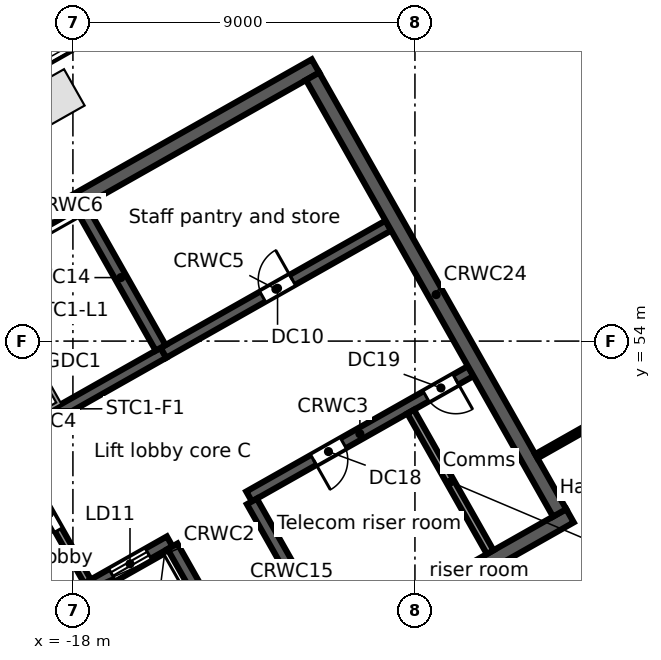
"""IFC4 building model, lengths in metres.
Left out: names, types, materials, properties, quantities, classifications, styles, units other than length and angle.
Written with IfcOpenShell. Run it as: python <this file> out.ifc"""

import sys

from ifc_helpers import new_model, si_unit, direction, frame, frame_2d, origin, origin_2d, place, context, subcontext, project, spatial, rectangle, extrude, element, fill, save


model = new_model("IFC4")
c1 = context("Model", 3, precision=1e-05, world=origin(), true_north=direction((0.0, 1.0)))
c2 = subcontext(c1, "Body", "Model", "MODEL_VIEW")
j1 = project(units=[si_unit("LENGTHUNIT", "METRE"), si_unit("PLANEANGLEUNIT", "RADIAN")], contexts=[c1])
p1 = place(None, origin())
s1 = spatial("IfcSite", under=j1, at=p1, CompositionType="ELEMENT")
p2 = place(p1, origin())
s2 = spatial("IfcBuilding", under=s1, at=p2, CompositionType="ELEMENT")
p3 = place(p2, frame((0.0, 0.0, 281.7)))
s3 = spatial("IfcBuildingStorey", under=s2, at=p3, CompositionType="ELEMENT", Elevation=281.7)
p4 = place(p3, frame((-18.441, 60.406, 0.0), z_axis=(0.0, 0.0, 1.0), x_axis=(-0.87035569594, -0.492423560103, 0.0)))
e1 = element("IfcColumn", 1, at=p4, inside=s3, PredefinedType="COLUMN", context=c2, shape_type="SweptSolid", body=[
    extrude(rectangle(XDim=1.1, YDim=1.1, at=origin_2d()), origin(), (0.0, 0.0, 1.0), 3.8),
])
p5 = place(p3, frame((-58.732, 38.771, 0.0), z_axis=(0.0, 0.0, 1.0), x_axis=(0.870355615581, 0.492423702137, 0.0)))
e2 = element("IfcWall", 2, at=p5, inside=s3, PredefinedType="STANDARD", context=c2, shape_type="SweptSolid", body=[
    extrude(rectangle(XDim=64.052, YDim=0.25, at=frame_2d((32.026, 0.0))), origin(), (0.0, 0.0, 1.0), 3.45),
])
p6 = place(p5, frame((61.259, 0.0, 0.8)))
e3 = element("IfcOpeningElement", 3, at=p6, cuts=e2, PredefinedType="OPENING", context=c2, shape_type="SweptSolid", body=[
    extrude(rectangle(XDim=2.4, YDim=2.2, at=frame_2d((1.2, 1.1))), frame((0.0, 0.135, 0.0), z_axis=(0.0, -1.0, 0.0), x_axis=(1.0, 0.0, 0.0)), (0.0, 0.0, 1.0), 0.27),
])
p7 = place(p5, frame((58.216, 0.0, 0.8)))
e4 = element("IfcOpeningElement", 4, at=p7, cuts=e2, PredefinedType="OPENING", context=c2, shape_type="SweptSolid", body=[
    extrude(rectangle(XDim=2.4, YDim=2.2, at=frame_2d((1.2, 1.1))), frame((0.0, 0.135, 0.0), z_axis=(0.0, -1.0, 0.0), x_axis=(1.0, 0.0, 0.0)), (0.0, 0.0, 1.0), 0.27),
])
p8 = place(p5, frame((55.173, 0.0, 0.8)))
e5 = element("IfcOpeningElement", 5, at=p8, cuts=e2, PredefinedType="OPENING", context=c2, shape_type="SweptSolid", body=[
    extrude(rectangle(XDim=2.4, YDim=2.2, at=frame_2d((1.2, 1.1))), frame((0.0, 0.135, 0.0), z_axis=(0.0, -1.0, 0.0), x_axis=(1.0, 0.0, 0.0)), (0.0, 0.0, 1.0), 0.27),
])
p9 = place(p5, frame((52.129, 0.0, 0.8)))
e6 = element("IfcOpeningElement", 6, at=p9, cuts=e2, PredefinedType="OPENING", context=c2, shape_type="SweptSolid", body=[
    extrude(rectangle(XDim=2.4, YDim=2.2, at=frame_2d((1.2, 1.1))), frame((0.0, 0.135, 0.0), z_axis=(0.0, -1.0, 0.0), x_axis=(1.0, 0.0, 0.0)), (0.0, 0.0, 1.0), 0.27),
])
p10 = place(p5, frame((49.086, 0.0, 0.8)))
e7 = element("IfcOpeningElement", 7, at=p10, cuts=e2, PredefinedType="OPENING", context=c2, shape_type="SweptSolid", body=[
    extrude(rectangle(XDim=2.4, YDim=2.2, at=frame_2d((1.2, 1.1))), frame((0.0, 0.135, 0.0), z_axis=(0.0, -1.0, 0.0), x_axis=(1.0, 0.0, 0.0)), (0.0, 0.0, 1.0), 0.27),
])
p11 = place(p5, frame((46.043, 0.0, 0.8)))
e8 = element("IfcOpeningElement", 8, at=p11, cuts=e2, PredefinedType="OPENING", context=c2, shape_type="SweptSolid", body=[
    extrude(rectangle(XDim=2.4, YDim=2.2, at=frame_2d((1.2, 1.1))), frame((0.0, 0.135, 0.0), z_axis=(0.0, -1.0, 0.0), x_axis=(1.0, 0.0, 0.0)), (0.0, 0.0, 1.0), 0.27),
])
p12 = place(p5, frame((43.0, 0.0, 0.8)))
e9 = element("IfcOpeningElement", 9, at=p12, cuts=e2, PredefinedType="OPENING", context=c2, shape_type="SweptSolid", body=[
    extrude(rectangle(XDim=2.4, YDim=2.2, at=frame_2d((1.2, 1.1))), frame((0.0, 0.135, 0.0), z_axis=(0.0, -1.0, 0.0), x_axis=(1.0, 0.0, 0.0)), (0.0, 0.0, 1.0), 0.27),
])
p13 = place(p5, frame((39.956, 0.0, 0.8)))
e10 = element("IfcOpeningElement", 10, at=p13, cuts=e2, PredefinedType="OPENING", context=c2, shape_type="SweptSolid", body=[
    extrude(rectangle(XDim=2.4, YDim=2.2, at=frame_2d((1.2, 1.1))), frame((0.0, 0.135, 0.0), z_axis=(0.0, -1.0, 0.0), x_axis=(1.0, 0.0, 0.0)), (0.0, 0.0, 1.0), 0.27),
])
p14 = place(p5, frame((36.913, 0.0, 0.8)))
e11 = element("IfcOpeningElement", 11, at=p14, cuts=e2, PredefinedType="OPENING", context=c2, shape_type="SweptSolid", body=[
    extrude(rectangle(XDim=2.4, YDim=2.2, at=frame_2d((1.2, 1.1))), frame((0.0, 0.135, 0.0), z_axis=(0.0, -1.0, 0.0), x_axis=(1.0, 0.0, 0.0)), (0.0, 0.0, 1.0), 0.27),
])
p15 = place(p5, frame((33.87, 0.0, 0.8)))
e12 = element("IfcOpeningElement", 12, at=p15, cuts=e2, PredefinedType="OPENING", context=c2, shape_type="SweptSolid", body=[
    extrude(rectangle(XDim=2.4, YDim=2.2, at=frame_2d((1.2, 1.1))), frame((0.0, 0.135, 0.0), z_axis=(0.0, -1.0, 0.0), x_axis=(1.0, 0.0, 0.0)), (0.0, 0.0, 1.0), 0.27),
])
p16 = place(p5, frame((30.826, 0.0, 0.8)))
e13 = element("IfcOpeningElement", 13, at=p16, cuts=e2, PredefinedType="OPENING", context=c2, shape_type="SweptSolid", body=[
    extrude(rectangle(XDim=2.4, YDim=2.2, at=frame_2d((1.2, 1.1))), frame((0.0, 0.135, 0.0), z_axis=(0.0, -1.0, 0.0), x_axis=(1.0, 0.0, 0.0)), (0.0, 0.0, 1.0), 0.27),
])
p17 = place(p5, frame((27.783, 0.0, 0.8)))
e14 = element("IfcOpeningElement", 14, at=p17, cuts=e2, PredefinedType="OPENING", context=c2, shape_type="SweptSolid", body=[
    extrude(rectangle(XDim=2.4, YDim=2.2, at=frame_2d((1.2, 1.1))), frame((0.0, 0.135, 0.0), z_axis=(0.0, -1.0, 0.0), x_axis=(1.0, 0.0, 0.0)), (0.0, 0.0, 1.0), 0.27),
])
p18 = place(p5, frame((24.74, 0.0, 0.8)))
e15 = element("IfcOpeningElement", 15, at=p18, cuts=e2, PredefinedType="OPENING", context=c2, shape_type="SweptSolid", body=[
    extrude(rectangle(XDim=2.4, YDim=2.2, at=frame_2d((1.2, 1.1))), frame((0.0, 0.135, 0.0), z_axis=(0.0, -1.0, 0.0), x_axis=(1.0, 0.0, 0.0)), (0.0, 0.0, 1.0), 0.27),
])
p19 = place(p5, frame((21.696, 0.0, 0.8)))
e16 = element("IfcOpeningElement", 16, at=p19, cuts=e2, PredefinedType="OPENING", context=c2, shape_type="SweptSolid", body=[
    extrude(rectangle(XDim=2.4, YDim=2.2, at=frame_2d((1.2, 1.1))), frame((0.0, 0.135, 0.0), z_axis=(0.0, -1.0, 0.0), x_axis=(1.0, 0.0, 0.0)), (0.0, 0.0, 1.0), 0.27),
])
p20 = place(p5, frame((18.653, 0.0, 0.8)))
e17 = element("IfcOpeningElement", 17, at=p20, cuts=e2, PredefinedType="OPENING", context=c2, shape_type="SweptSolid", body=[
    extrude(rectangle(XDim=2.4, YDim=2.2, at=frame_2d((1.2, 1.1))), frame((0.0, 0.135, 0.0), z_axis=(0.0, -1.0, 0.0), x_axis=(1.0, 0.0, 0.0)), (0.0, 0.0, 1.0), 0.27),
])
p21 = place(p5, frame((15.61, 0.0, 0.8)))
e18 = element("IfcOpeningElement", 18, at=p21, cuts=e2, PredefinedType="OPENING", context=c2, shape_type="SweptSolid", body=[
    extrude(rectangle(XDim=2.4, YDim=2.2, at=frame_2d((1.2, 1.1))), frame((0.0, 0.135, 0.0), z_axis=(0.0, -1.0, 0.0), x_axis=(1.0, 0.0, 0.0)), (0.0, 0.0, 1.0), 0.27),
])
p22 = place(p5, frame((12.567, 0.0, 0.8)))
e19 = element("IfcOpeningElement", 19, at=p22, cuts=e2, PredefinedType="OPENING", context=c2, shape_type="SweptSolid", body=[
    extrude(rectangle(XDim=2.4, YDim=2.2, at=frame_2d((1.2, 1.1))), frame((0.0, 0.135, 0.0), z_axis=(0.0, -1.0, 0.0), x_axis=(1.0, 0.0, 0.0)), (0.0, 0.0, 1.0), 0.27),
])
p23 = place(p5, frame((9.523, 0.0, 0.8)))
e20 = element("IfcOpeningElement", 20, at=p23, cuts=e2, PredefinedType="OPENING", context=c2, shape_type="SweptSolid", body=[
    extrude(rectangle(XDim=2.4, YDim=2.2, at=frame_2d((1.2, 1.1))), frame((0.0, 0.135, 0.0), z_axis=(0.0, -1.0, 0.0), x_axis=(1.0, 0.0, 0.0)), (0.0, 0.0, 1.0), 0.27),
])
p24 = place(p5, frame((6.48, 0.0, 0.8)))
e21 = element("IfcOpeningElement", 21, at=p24, cuts=e2, PredefinedType="OPENING", context=c2, shape_type="SweptSolid", body=[
    extrude(rectangle(XDim=2.4, YDim=2.2, at=frame_2d((1.2, 1.1))), frame((0.0, 0.135, 0.0), z_axis=(0.0, -1.0, 0.0), x_axis=(1.0, 0.0, 0.0)), (0.0, 0.0, 1.0), 0.27),
])
p25 = place(p5, frame((3.437, 0.0, 0.8)))
e22 = element("IfcOpeningElement", 22, at=p25, cuts=e2, PredefinedType="OPENING", context=c2, shape_type="SweptSolid", body=[
    extrude(rectangle(XDim=2.4, YDim=2.2, at=frame_2d((1.2, 1.1))), frame((0.0, 0.135, 0.0), z_axis=(0.0, -1.0, 0.0), x_axis=(1.0, 0.0, 0.0)), (0.0, 0.0, 1.0), 0.27),
])
p26 = place(p5, frame((0.393, 0.0, 0.8)))
e23 = element("IfcOpeningElement", 23, at=p26, cuts=e2, PredefinedType="OPENING", context=c2, shape_type="SweptSolid", body=[
    extrude(rectangle(XDim=2.4, YDim=2.2, at=frame_2d((1.2, 1.1))), frame((0.0, 0.135, 0.0), z_axis=(0.0, -1.0, 0.0), x_axis=(1.0, 0.0, 0.0)), (0.0, 0.0, 1.0), 0.27),
])
p27 = place(p3, frame((-17.975, 42.017, 0.0), z_axis=(0.0, 0.0, 1.0), x_axis=(0.87034965173, 0.492434243055, 0.0)))
e24 = element("IfcWall", 24, at=p27, inside=s3, PredefinedType="SOLIDWALL", context=c2, shape_type="SweptSolid", body=[
    extrude(rectangle(XDim=15.0, YDim=0.4, at=frame_2d((7.5, 0.0))), origin(), (0.0, 0.0, 1.0), 3.45),
])
p28 = place(p27, frame((6.1, 0.0, 0.0)))
e25 = element("IfcOpeningElement", 25, at=p28, cuts=e24, PredefinedType="OPENING", context=c2, shape_type="SweptSolid", body=[
    extrude(rectangle(XDim=1.2, YDim=2.1, at=frame_2d((0.6, 1.05))), frame((0.0, 0.21, 0.0), z_axis=(0.0, -1.0, 0.0), x_axis=(1.0, 0.0, 0.0)), (0.0, 0.0, 1.0), 0.42),
])
p29 = place(p3, frame((-19.892, 46.218, 0.0), z_axis=(0.0, 0.0, 1.0), x_axis=(0.870341639186, 0.492448404505, 0.0)))
e26 = element("IfcWall", 26, at=p29, inside=s3, PredefinedType="SOLIDWALL", context=c2, shape_type="SweptSolid", body=[
    extrude(rectangle(XDim=5.1, YDim=0.3, at=frame_2d((2.55, 0.0))), origin(), (0.0, 0.0, 1.0), 3.45),
])
p30 = place(p29, frame((0.75, 0.0, 0.0)))
e27 = element("IfcOpeningElement", 27, at=p30, cuts=e26, PredefinedType="OPENING", context=c2, shape_type="SweptSolid", body=[
    extrude(rectangle(XDim=1.1, YDim=2.1, at=frame_2d((0.55, 1.05))), frame((0.0, 0.16, 0.0), z_axis=(0.0, -1.0, 0.0), x_axis=(1.0, 0.0, 0.0)), (0.0, 0.0, 1.0), 0.32),
])
p31 = place(p29, frame((3.35, 0.0, 0.0)))
e28 = element("IfcOpeningElement", 28, at=p31, cuts=e26, PredefinedType="OPENING", context=c2, shape_type="SweptSolid", body=[
    extrude(rectangle(XDim=1.1, YDim=2.1, at=frame_2d((0.55, 1.05))), frame((0.0, 0.16, 0.0), z_axis=(0.0, -1.0, 0.0), x_axis=(1.0, 0.0, 0.0)), (0.0, 0.0, 1.0), 0.32),
])
p32 = place(p3, frame((-13.365, 49.911, 0.0), z_axis=(0.0, 0.0, 1.0), x_axis=(0.870347618718, 0.492437836272, 0.0)))
e29 = element("IfcWall", 29, at=p32, inside=s3, PredefinedType="SOLIDWALL", context=c2, shape_type="SweptSolid", body=[
    extrude(rectangle(XDim=6.7, YDim=0.3, at=frame_2d((3.35, 0.0))), origin(), (0.0, 0.0, 1.0), 3.45),
])
p33 = place(p32, frame((1.95, 0.0, 0.0)))
e30 = element("IfcOpeningElement", 30, at=p33, cuts=e29, PredefinedType="OPENING", context=c2, shape_type="SweptSolid", body=[
    extrude(rectangle(XDim=0.9, YDim=2.1, at=frame_2d((0.45, 1.05))), frame((0.0, 0.16, 0.0), z_axis=(0.0, -1.0, 0.0), x_axis=(1.0, 0.0, 0.0)), (0.0, 0.0, 1.0), 0.32),
])
p34 = place(p32, frame((5.35, 0.0, 0.0)))
e31 = element("IfcOpeningElement", 31, at=p34, cuts=e29, PredefinedType="OPENING", context=c2, shape_type="SweptSolid", body=[
    extrude(rectangle(XDim=0.9, YDim=2.1, at=frame_2d((0.45, 1.05))), frame((0.0, 0.16, 0.0), z_axis=(0.0, -1.0, 0.0), x_axis=(1.0, 0.0, 0.0)), (0.0, 0.0, 1.0), 0.32),
])
p35 = place(p3, frame((-22.059, 50.047, 0.0), z_axis=(0.0, 0.0, 1.0), x_axis=(0.87035077051, 0.49243226567, 0.0)))
e32 = element("IfcWall", 32, at=p35, inside=s3, PredefinedType="SOLIDWALL", context=c2, shape_type="SweptSolid", body=[
    extrude(rectangle(XDim=7.4, YDim=0.3, at=frame_2d((3.7, 0.0))), origin(), (0.0, 0.0, 1.0), 3.45),
])
p36 = place(p35, frame((0.4, 0.0, 0.0)))
e33 = element("IfcOpeningElement", 33, at=p36, cuts=e32, PredefinedType="OPENING", context=c2, shape_type="SweptSolid", body=[
    extrude(rectangle(XDim=1.0, YDim=2.1, at=frame_2d((0.5, 1.05))), frame((0.0, 0.16, 0.0), z_axis=(0.0, -1.0, 0.0), x_axis=(1.0, 0.0, 0.0)), (0.0, 0.0, 1.0), 0.32),
])
p37 = place(p3, frame((-15.618, 53.691, 0.0), z_axis=(0.0, 0.0, 1.0), x_axis=(0.870362830851, 0.492410948978, 0.0)))
e34 = element("IfcWall", 34, at=p37, inside=s3, PredefinedType="SOLIDWALL", context=c2, shape_type="SweptSolid", body=[
    extrude(rectangle(XDim=6.8, YDim=0.3, at=frame_2d((3.4, 0.0))), origin(), (0.0, 0.0, 1.0), 3.45),
])
p38 = place(p37, frame((3.0, 0.0, 0.0)))
e35 = element("IfcOpeningElement", 35, at=p38, cuts=e34, PredefinedType="OPENING", context=c2, shape_type="SweptSolid", body=[
    extrude(rectangle(XDim=0.9, YDim=2.1, at=frame_2d((0.45, 1.05))), frame((0.0, 0.16, 0.0), z_axis=(0.0, -1.0, 0.0), x_axis=(1.0, 0.0, 0.0)), (0.0, 0.0, 1.0), 0.32),
])
p39 = place(p3, frame((-24.672, 53.854, 0.0), z_axis=(0.0, 0.0, 1.0), x_axis=(0.870353598469, 0.492427267353, 0.0)))
e36 = element("IfcWall", 36, at=p39, inside=s3, PredefinedType="SOLIDWALL", context=c2, shape_type="SweptSolid", body=[
    extrude(rectangle(XDim=15.0, YDim=0.4, at=frame_2d((7.5, 0.0))), origin(), (0.0, 0.0, 1.0), 3.45),
])
p40 = place(p3, frame((-24.4, 53.779, 0.0), z_axis=(0.0, 0.0, 1.0), x_axis=(0.492421663121, -0.870356769198, 0.0)))
e37 = element("IfcWall", 37, at=p40, inside=s3, PredefinedType="SOLIDWALL", context=c2, shape_type="SweptSolid", body=[
    extrude(rectangle(XDim=13.2, YDim=0.4, at=frame_2d((6.6, 0.0))), origin(), (0.0, 0.0, 1.0), 3.45),
])
p41 = place(p3, frame((-19.635, 51.246, 0.0), z_axis=(0.0, 0.0, 1.0), x_axis=(0.492408451753, -0.87036424366, 0.0)))
e38 = element("IfcWall", 38, at=p41, inside=s3, PredefinedType="PARTITIONING", context=c2, shape_type="SweptSolid", body=[
    extrude(rectangle(XDim=4.1, YDim=0.2, at=frame_2d((2.05, 0.0))), origin(), (0.0, 0.0, 1.0), 3.45),
])
p42 = place(p41, frame((1.55, 0.0, 0.0)))
e39 = element("IfcOpeningElement", 39, at=p42, cuts=e38, PredefinedType="OPENING", context=c2, shape_type="SweptSolid", body=[
    extrude(rectangle(XDim=1.0, YDim=2.1, at=frame_2d((0.5, 1.05))), frame((0.0, 0.11, 0.0), z_axis=(0.0, -1.0, 0.0), x_axis=(1.0, 0.0, 0.0)), (0.0, 0.0, 1.0), 0.22),
])
for number, where, z_axis, x_axis in (
    (40, (-15.379, 48.599, 0.0), (0.0, 0.0, 1.0), (0.492, -0.87, 0.0)),
    (41, (-17.785, 57.521, 0.0), (0.0, 0.0, 1.0), (0.492, -0.87, 0.0)),
):
    element("IfcWall", number, at=place(p3, frame(where, z_axis=z_axis, x_axis=x_axis)), inside=s3, PredefinedType="SOLIDWALL", context=c2, shape_type="SweptSolid", body=[
        extrude(rectangle(XDim=4.25, YDim=0.3, at=frame_2d((2.125, 0.0))), origin(), (0.0, 0.0, 1.0), 3.45),
    ])
p43 = place(p3, frame((-13.291, 49.781, 0.0), z_axis=(0.0, 0.0, 1.0), x_axis=(0.492397924348, -0.870370199454, 0.0)))
e42 = element("IfcWall", 42, at=p43, inside=s3, PredefinedType="SOLIDWALL", context=c2, shape_type="SweptSolid", body=[
    extrude(rectangle(XDim=4.25, YDim=0.3, at=frame_2d((2.125, 0.0))), origin(), (0.0, 0.0, 1.0), 3.45),
])
p44 = place(p3, frame((-9.113, 52.144, 0.0), z_axis=(0.0, 0.0, 1.0), x_axis=(0.492422543467, -0.870356271124, 0.0)))
e43 = element("IfcWall", 43, at=p44, inside=s3, PredefinedType="PARTITIONING", context=c2, shape_type="SweptSolid", body=[
    extrude(rectangle(XDim=4.25, YDim=0.2, at=frame_2d((2.125, 0.0))), origin(), (0.0, 0.0, 1.0), 3.45),
])
p45 = place(p3, frame((-11.692, 60.968, 0.0), z_axis=(0.0, 0.0, 1.0), x_axis=(0.492421663121, -0.870356769198, 0.0)))
e44 = element("IfcWall", 44, at=p45, inside=s3, PredefinedType="SOLIDWALL", context=c2, shape_type="SweptSolid", body=[
    extrude(rectangle(XDim=13.2, YDim=0.4, at=frame_2d((6.6, 0.0))), origin(), (0.0, 0.0, 1.0), 3.45),
])
p46 = place(p3, frame((-5.806, 50.97, 0.0), z_axis=(0.0, 0.0, 1.0), x_axis=(0.870355163327, 0.492424501492, 0.0)))
e45 = element("IfcWall", 45, at=p46, inside=s3, PredefinedType="PARTITIONING", context=c2, shape_type="SweptSolid", body=[
    extrude(rectangle(XDim=6.527, YDim=0.125, at=frame_2d((3.264, 0.0))), origin(), (0.0, 0.0, 1.0), 2.73),
])
p47 = place(p46, frame((2.45, 0.0, 0.0)))
e46 = element("IfcOpeningElement", 46, at=p47, cuts=e45, PredefinedType="OPENING", context=c2, shape_type="SweptSolid", body=[
    extrude(rectangle(XDim=1.8, YDim=2.1, at=frame_2d((0.9, 1.05))), frame((0.0, 0.073, 0.0), z_axis=(0.0, -1.0, 0.0), x_axis=(1.0, 0.0, 0.0)), (0.0, 0.0, 1.0), 0.145),
])
p48 = place(p11, origin())
e47 = element("IfcWindow", 47, at=p48, inside=s3, PartitioningType="SINGLE_PANEL", PredefinedType="WINDOW", context=c2, shape_type="SweptSolid", body=[
    extrude(rectangle(XDim=2.4, YDim=2.2, at=frame_2d((1.2, 1.1))), frame((0.0, 0.03, 0.0), z_axis=(0.0, -1.0, 0.0), x_axis=(1.0, 0.0, 0.0)), (0.0, 0.0, 1.0), 0.06),
])
fill(e8, e47)
p49 = place(p31, origin())
e48 = element("IfcDoor", 48, at=p49, inside=s3, OperationType="DOUBLE_DOOR_SLIDING", PredefinedType="DOOR", context=c2, shape_type="SweptSolid", body=[
    extrude(rectangle(XDim=1.1, YDim=2.1, at=frame_2d((0.55, 1.05))), frame((0.0, 0.025, 0.0), z_axis=(0.0, -1.0, 0.0), x_axis=(1.0, 0.0, 0.0)), (0.0, 0.0, 1.0), 0.05),
])
fill(e28, e48)
p50 = place(p42, frame((1.0, 0.0, 0.0), z_axis=(0.0, 0.0, 1.0), x_axis=(-1.0, 0.0, 0.0)))
e49 = element("IfcDoor", 49, at=p50, inside=s3, OperationType="SINGLE_SWING_RIGHT", PredefinedType="DOOR", context=c2, shape_type="SweptSolid", body=[
    extrude(rectangle(XDim=1.0, YDim=2.1, at=frame_2d((0.5, 1.05))), frame((0.0, 0.025, 0.0), z_axis=(0.0, -1.0, 0.0), x_axis=(1.0, 0.0, 0.0)), (0.0, 0.0, 1.0), 0.05),
])
fill(e39, e49)
p51 = place(p38, origin())
e50 = element("IfcDoor", 50, at=p51, inside=s3, OperationType="SINGLE_SWING_RIGHT", PredefinedType="DOOR", context=c2, shape_type="SweptSolid", body=[
    extrude(rectangle(XDim=0.9, YDim=2.1, at=frame_2d((0.45, 1.05))), frame((0.0, 0.025, 0.0), z_axis=(0.0, -1.0, 0.0), x_axis=(1.0, 0.0, 0.0)), (0.0, 0.0, 1.0), 0.05),
])
fill(e35, e50)
p52 = place(p33, frame((0.9, 0.0, 0.0), z_axis=(0.0, 0.0, 1.0), x_axis=(-1.0, 0.0, 0.0)))
e51 = element("IfcDoor", 51, at=p52, inside=s3, OperationType="SINGLE_SWING_RIGHT", PredefinedType="DOOR", context=c2, shape_type="SweptSolid", body=[
    extrude(rectangle(XDim=0.9, YDim=2.1, at=frame_2d((0.45, 1.05))), frame((0.0, 0.025, 0.0), z_axis=(0.0, -1.0, 0.0), x_axis=(1.0, 0.0, 0.0)), (0.0, 0.0, 1.0), 0.05),
])
fill(e30, e51)
p53 = place(p34, frame((0.9, 0.0, 0.0), z_axis=(0.0, 0.0, 1.0), x_axis=(-1.0, 0.0, 0.0)))
e52 = element("IfcDoor", 52, at=p53, inside=s3, OperationType="SINGLE_SWING_LEFT", PredefinedType="DOOR", context=c2, shape_type="SweptSolid", body=[
    extrude(rectangle(XDim=0.9, YDim=2.1, at=frame_2d((0.45, 1.05))), frame((0.0, 0.025, 0.0), z_axis=(0.0, -1.0, 0.0), x_axis=(1.0, 0.0, 0.0)), (0.0, 0.0, 1.0), 0.05),
])
fill(e31, e52)
save(model, sys.argv[1])
